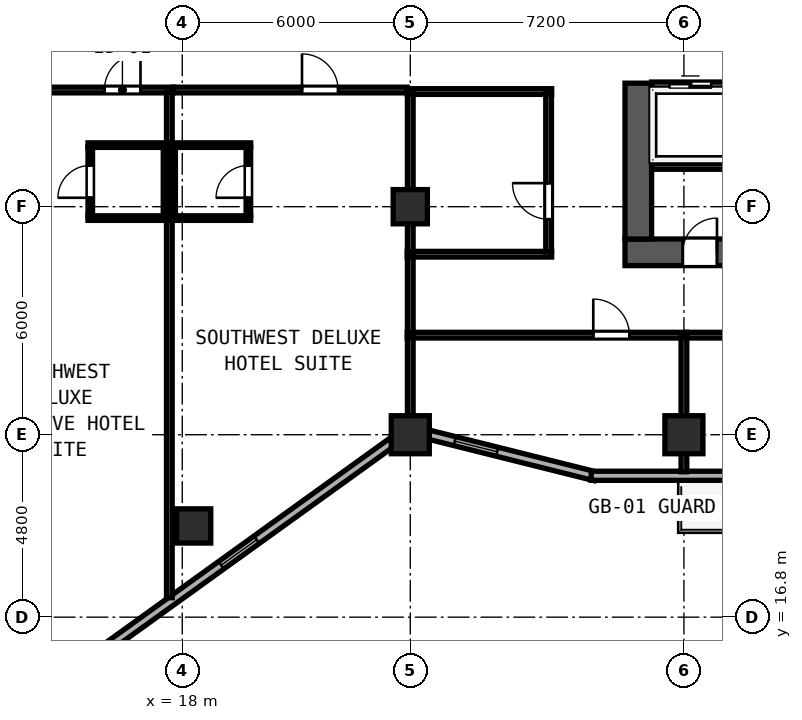
"""IFC4 building model, lengths in metres.
Left out: names, types, materials, properties, quantities, classifications, styles, units other than length and angle.
Written with IfcOpenShell. Run it as: python <this file> out.ifc"""

import sys

from ifc_helpers import new_model, si_unit, direction, frame, frame_2d, origin, origin_2d, place, context, subcontext, project, spatial, rectangle, hollow_rectangle, extrude, element, fill, save


model = new_model("IFC4")
c1 = context("Model", 3, precision=1e-05, world=origin(), true_north=direction((0.0, 1.0)))
c2 = subcontext(c1, "Body", "Model", "MODEL_VIEW")
j1 = project(units=[si_unit("LENGTHUNIT", "METRE"), si_unit("PLANEANGLEUNIT", "RADIAN")], contexts=[c1])
p1 = place(None, origin())
s1 = spatial("IfcSite", under=j1, at=p1, CompositionType="ELEMENT")
p2 = place(p1, origin())
s2 = spatial("IfcBuilding", under=s1, at=p2, CompositionType="ELEMENT")
p3 = place(p2, frame((0.0, 0.0, 144.8)))
s3 = spatial("IfcBuildingStorey", under=s2, at=p3, CompositionType="ELEMENT", Elevation=144.8)
p4 = place(p3, frame((29.65, 26.4, 0.0), z_axis=(0.0, 0.0, 1.0), x_axis=(1.0, 0.0, 0.0)))
e1 = element("IfcWall", 1, at=p4, inside=s3, PredefinedType="SHEAR", context=c2, shape_type="SweptSolid", body=[
    extrude(rectangle(XDim=17.5, YDim=0.7, at=frame_2d((8.75, 0.0))), origin(), (0.0, 0.0, 1.0), 3.6),
])
p5 = place(p4, frame((2.42, 0.0, 0.0), z_axis=(0.0, 0.0, 1.0), x_axis=(-1.0, 0.0, 0.0)))
e2 = element("IfcOpeningElement", 2, at=p5, cuts=e1, PredefinedType="OPENING", context=c2, shape_type="SweptSolid", body=[
    extrude(rectangle(XDim=0.9, YDim=2.1, at=frame_2d((0.45, 1.05))), frame((0.0, 0.36, 0.0), z_axis=(0.0, -1.0, 0.0), x_axis=(1.0, 0.0, 0.0)), (0.0, 0.0, 1.0), 0.72),
])
p6 = place(p4, frame((7.26, 0.0, 0.0), z_axis=(0.0, 0.0, 1.0), x_axis=(-1.0, 0.0, 0.0)))
e3 = element("IfcOpeningElement", 3, at=p6, cuts=e1, PredefinedType="OPENING", context=c2, shape_type="SweptSolid", body=[
    extrude(rectangle(XDim=0.9, YDim=2.1, at=frame_2d((0.45, 1.05))), frame((0.0, 0.36, 0.0), z_axis=(0.0, -1.0, 0.0), x_axis=(1.0, 0.0, 0.0)), (0.0, 0.0, 1.0), 0.72),
])
p7 = place(p4, frame((13.06, 0.0, 0.0), z_axis=(0.0, 0.0, 1.0), x_axis=(-1.0, 0.0, 0.0)))
e4 = element("IfcOpeningElement", 4, at=p7, cuts=e1, PredefinedType="OPENING", context=c2, shape_type="SweptSolid", body=[
    extrude(rectangle(XDim=0.9, YDim=2.1, at=frame_2d((0.45, 1.05))), frame((0.0, 0.36, 0.0), z_axis=(0.0, -1.0, 0.0), x_axis=(1.0, 0.0, 0.0)), (0.0, 0.0, 1.0), 0.72),
])
p8 = place(p3, frame((30.0, 26.75, 0.0), z_axis=(0.0, 0.0, 1.0), x_axis=(0.0, 1.0, 0.0)))
e5 = element("IfcWall", 5, at=p8, inside=s3, PredefinedType="SHEAR", context=c2, shape_type="SweptSolid", body=[
    extrude(rectangle(XDim=4.1, YDim=0.7, at=frame_2d((2.05, 0.0))), origin(), (0.0, 0.0, 1.0), 3.6),
])
for number, where, z_axis, x_axis in (
    (6, (24.0, 21.6, 0.0), (0.0, 0.0, 1.0), (1.0, 0.0, 0.0)),
    (7, (31.2, 21.6, 0.0), (0.0, 0.0, 1.0), (1.0, 0.0, 0.0)),
):
    element("IfcColumn", number, at=place(p3, frame(where, z_axis=z_axis, x_axis=x_axis)), inside=s3, PredefinedType="COLUMN", context=c2, shape_type="SweptSolid", body=[
        extrude(hollow_rectangle(XDim=1.0, YDim=1.0, WallThickness=0.038, at=origin_2d()), origin(), (0.0, 0.0, 1.0), 3.8),
    ])
for number, where, z_axis, x_axis in (
    (8, (24.0, 27.6, 0.0), (0.0, 0.0, 1.0), (1.0, 0.0, 0.0)),
    (9, (18.3, 19.2, 0.0), (0.0, 0.0, 1.0), (1.0, 0.0, 0.0)),
):
    element("IfcColumn", number, at=place(p3, frame(where, z_axis=z_axis, x_axis=x_axis)), inside=s3, PredefinedType="COLUMN", context=c2, shape_type="SweptSolid", body=[
        extrude(hollow_rectangle(XDim=0.9, YDim=0.9, WallThickness=0.034, at=origin_2d()), origin(), (0.0, 0.0, 1.0), 3.8),
    ])
p9 = place(p3, frame((14.075, 14.602, 0.0), z_axis=(0.0, 0.0, 1.0), x_axis=(0.811543504691, 0.584291998913, 0.0)))
e10 = element("IfcWall", 10, at=p9, inside=s3, PredefinedType="SOLIDWALL", context=c2, shape_type="SweptSolid", body=[
    extrude(rectangle(XDim=11.623, YDim=0.24, at=frame_2d((5.812, 0.0))), origin(), (0.0, 0.0, 1.0), 3.145),
])
p10 = place(p9, frame((0.7, 0.0, 0.85)))
e11 = element("IfcOpeningElement", 11, at=p10, cuts=e10, PredefinedType="OPENING", context=c2, shape_type="SweptSolid", body=[
    extrude(rectangle(XDim=1.15, YDim=1.8, at=frame_2d((0.575, 0.9))), frame((0.0, 0.13, 0.0), z_axis=(0.0, -1.0, 0.0), x_axis=(1.0, 0.0, 0.0)), (0.0, 0.0, 1.0), 0.26),
])
p11 = place(p9, frame((6.1, 0.0, 0.85)))
e12 = element("IfcOpeningElement", 12, at=p11, cuts=e10, PredefinedType="OPENING", context=c2, shape_type="SweptSolid", body=[
    extrude(rectangle(XDim=1.15, YDim=1.8, at=frame_2d((0.575, 0.9))), frame((0.0, 0.13, 0.0), z_axis=(0.0, -1.0, 0.0), x_axis=(1.0, 0.0, 0.0)), (0.0, 0.0, 1.0), 0.26),
])
p12 = place(p3, frame((24.492, 21.601, 0.0), z_axis=(0.0, 0.0, 1.0), x_axis=(0.970145683738, -0.242522890311, 0.0)))
e13 = element("IfcWall", 13, at=p12, inside=s3, PredefinedType="SOLIDWALL", context=c2, shape_type="SweptSolid", body=[
    extrude(rectangle(XDim=4.511, YDim=0.24, at=frame_2d((2.255, 0.0))), origin(), (0.0, 0.0, 1.0), 3.145),
])
p13 = place(p12, frame((0.7, 0.0, 0.85)))
e14 = element("IfcOpeningElement", 14, at=p13, cuts=e13, PredefinedType="OPENING", context=c2, shape_type="SweptSolid", body=[
    extrude(rectangle(XDim=1.15, YDim=1.8, at=frame_2d((0.575, 0.9))), frame((0.0, 0.13, 0.0), z_axis=(0.0, -1.0, 0.0), x_axis=(1.0, 0.0, 0.0)), (0.0, 0.0, 1.0), 0.26),
])
p14 = place(p3, frame((28.76, 20.52, 0.0), z_axis=(0.0, 0.0, 1.0), x_axis=(1.0, 0.0, 0.0)))
e15 = element("IfcWall", 15, at=p14, inside=s3, PredefinedType="SOLIDWALL", context=c2, shape_type="SweptSolid", body=[
    extrude(rectangle(XDim=19.281, YDim=0.24, at=frame_2d((9.64, 0.0))), origin(), (0.0, 0.0, 1.0), 3.6),
])
p15 = place(p14, frame((4.84, 0.0, 0.0), z_axis=(0.0, 0.0, 1.0), x_axis=(-1.0, 0.0, 0.0)))
e16 = element("IfcOpeningElement", 16, at=p15, cuts=e15, PredefinedType="OPENING", context=c2, shape_type="SweptSolid", body=[
    extrude(rectangle(XDim=1.2, YDim=2.15, at=frame_2d((0.6, 1.075))), frame((0.0, 0.13, 0.0), z_axis=(0.0, -1.0, 0.0), x_axis=(1.0, 0.0, 0.0)), (0.0, 0.0, 1.0), 0.26),
])
p16 = place(p14, frame((15.64, 0.0, 0.0), z_axis=(0.0, 0.0, 1.0), x_axis=(-1.0, 0.0, 0.0)))
e17 = element("IfcOpeningElement", 17, at=p16, cuts=e15, PredefinedType="OPENING", context=c2, shape_type="SweptSolid", body=[
    extrude(rectangle(XDim=1.2, YDim=2.15, at=frame_2d((0.6, 1.075))), frame((0.0, 0.13, 0.0), z_axis=(0.0, -1.0, 0.0), x_axis=(1.0, 0.0, 0.0)), (0.0, 0.0, 1.0), 0.26),
])
p17 = place(p3, frame((30.35, 30.8, 0.0), z_axis=(0.0, 0.0, 1.0), x_axis=(1.0, 0.0, 0.0)))
e18 = element("IfcWall", 18, at=p17, inside=s3, PredefinedType="SOLIDWALL", context=c2, shape_type="SweptSolid", body=[
    extrude(rectangle(XDim=16.1, YDim=0.16, at=frame_2d((8.05, 0.0))), origin(), (0.0, 0.0, 1.0), 3.6),
])
p18 = place(p17, frame((0.47, 0.0, 0.0)))
e19 = element("IfcOpeningElement", 19, at=p18, cuts=e18, PredefinedType="OPENING", context=c2, shape_type="SweptSolid", body=[
    extrude(rectangle(XDim=1.1, YDim=2.2, at=frame_2d((0.55, 1.1))), frame((0.0, 0.09, 0.0), z_axis=(0.0, -1.0, 0.0), x_axis=(1.0, 0.0, 0.0)), (0.0, 0.0, 1.0), 0.18),
])
p19 = place(p17, frame((2.53, 0.0, 0.0)))
e20 = element("IfcOpeningElement", 20, at=p19, cuts=e18, PredefinedType="OPENING", context=c2, shape_type="SweptSolid", body=[
    extrude(rectangle(XDim=1.1, YDim=2.2, at=frame_2d((0.55, 1.1))), frame((0.0, 0.09, 0.0), z_axis=(0.0, -1.0, 0.0), x_axis=(1.0, 0.0, 0.0)), (0.0, 0.0, 1.0), 0.18),
])
p20 = place(p17, frame((4.59, 0.0, 0.0)))
e21 = element("IfcOpeningElement", 21, at=p20, cuts=e18, PredefinedType="OPENING", context=c2, shape_type="SweptSolid", body=[
    extrude(rectangle(XDim=1.1, YDim=2.2, at=frame_2d((0.55, 1.1))), frame((0.0, 0.09, 0.0), z_axis=(0.0, -1.0, 0.0), x_axis=(1.0, 0.0, 0.0)), (0.0, 0.0, 1.0), 0.18),
])
p21 = place(p17, frame((6.65, 0.0, 0.0)))
e22 = element("IfcOpeningElement", 22, at=p21, cuts=e18, PredefinedType="OPENING", context=c2, shape_type="SweptSolid", body=[
    extrude(rectangle(XDim=1.1, YDim=2.2, at=frame_2d((0.55, 1.1))), frame((0.0, 0.09, 0.0), z_axis=(0.0, -1.0, 0.0), x_axis=(1.0, 0.0, 0.0)), (0.0, 0.0, 1.0), 0.18),
])
p22 = place(p3, frame((30.35, 28.66, 0.0), z_axis=(0.0, 0.0, 1.0), x_axis=(1.0, 0.0, 0.0)))
e23 = element("IfcWall", 23, at=p22, inside=s3, PredefinedType="PARTITIONING", context=c2, shape_type="SweptSolid", body=[
    extrude(rectangle(XDim=16.1, YDim=0.15, at=frame_2d((8.05, 0.0))), origin(), (0.0, 0.0, 1.0), 3.6),
])
for number, where, z_axis, x_axis in (
    (24, (23.92, 30.63, 0.0), (0.0, 0.0, 1.0), (1.0, 0.0, 0.0)),
    (25, (23.92, 26.35, 0.0), (0.0, 0.0, 1.0), (1.0, 0.0, 0.0)),
):
    element("IfcWall", number, at=place(p3, frame(where, z_axis=z_axis, x_axis=x_axis)), inside=s3, PredefinedType="PARTITIONING", context=c2, shape_type="SweptSolid", body=[
        extrude(rectangle(XDim=3.8, YDim=0.15, at=frame_2d((1.9, 0.0))), origin(), (0.0, 0.0, 1.0), 3.6),
    ])
p23 = place(p3, frame((24.0, 26.41, 0.0), z_axis=(0.0, 0.0, 1.0), x_axis=(0.0, 1.0, 0.0)))
e26 = element("IfcWall", 26, at=p23, inside=s3, PredefinedType="PARTITIONING", context=c2, shape_type="SweptSolid", body=[
    extrude(rectangle(XDim=4.16, YDim=0.15, at=frame_2d((2.08, 0.0))), origin(), (0.0, 0.0, 1.0), 3.145),
])
p24 = place(p3, frame((27.64, 26.41, 0.0), z_axis=(0.0, 0.0, 1.0), x_axis=(0.0, 1.0, 0.0)))
e27 = element("IfcWall", 27, at=p24, inside=s3, PredefinedType="PARTITIONING", context=c2, shape_type="SweptSolid", body=[
    extrude(rectangle(XDim=4.16, YDim=0.15, at=frame_2d((2.08, 0.0))), origin(), (0.0, 0.0, 1.0), 3.6),
])
p25 = place(p24, frame((1.81, 0.0, 0.0), z_axis=(0.0, 0.0, 1.0), x_axis=(-1.0, 0.0, 0.0)))
e28 = element("IfcOpeningElement", 28, at=p25, cuts=e27, PredefinedType="OPENING", context=c2, shape_type="SweptSolid", body=[
    extrude(rectangle(XDim=0.95, YDim=2.12, at=frame_2d((0.475, 1.06))), frame((0.0, 0.085, 0.0), z_axis=(0.0, -1.0, 0.0), x_axis=(1.0, 0.0, 0.0)), (0.0, 0.0, 1.0), 0.17),
])
p26 = place(p3, frame((23.92, 24.22, 0.0), z_axis=(0.0, 0.0, 1.0), x_axis=(1.0, 0.0, 0.0)))
e29 = element("IfcWall", 29, at=p26, inside=s3, PredefinedType="PARTITIONING", context=c2, shape_type="SweptSolid", body=[
    extrude(rectangle(XDim=7.36, YDim=0.15, at=frame_2d((3.68, 0.0))), origin(), (0.0, 0.0, 1.0), 3.6),
])
p27 = place(p26, frame((5.845, 0.0, 0.0), z_axis=(0.0, 0.0, 1.0), x_axis=(-1.0, 0.0, 0.0)))
e30 = element("IfcOpeningElement", 30, at=p27, cuts=e29, PredefinedType="OPENING", context=c2, shape_type="SweptSolid", body=[
    extrude(rectangle(XDim=0.95, YDim=2.12, at=frame_2d((0.475, 1.06))), frame((0.0, 0.085, 0.0), z_axis=(0.0, -1.0, 0.0), x_axis=(1.0, 0.0, 0.0)), (0.0, 0.0, 1.0), 0.17),
])
p28 = place(p3, frame((24.0, 21.819, 0.0), z_axis=(0.0, 0.0, 1.0), x_axis=(0.0, 1.0, 0.0)))
e31 = element("IfcWall", 31, at=p28, inside=s3, PredefinedType="PARTITIONING", context=c2, shape_type="SweptSolid", body=[
    extrude(rectangle(XDim=2.341, YDim=0.15, at=frame_2d((1.171, 0.0))), origin(), (0.0, 0.0, 1.0), 3.145),
])
p29 = place(p3, frame((31.2, 20.625, 0.0), z_axis=(0.0, 0.0, 1.0), x_axis=(0.0, 1.0, 0.0)))
e32 = element("IfcWall", 32, at=p29, inside=s3, PredefinedType="PARTITIONING", context=c2, shape_type="SweptSolid", body=[
    extrude(rectangle(XDim=3.535, YDim=0.15, at=frame_2d((1.768, 0.0))), origin(), (0.0, 0.0, 1.0), 3.085),
])
p30 = place(p3, frame((31.282, 24.22, 0.0), z_axis=(0.0, 0.0, 1.0), x_axis=(1.0, 0.0, 0.0)))
e33 = element("IfcWall", 33, at=p30, inside=s3, PredefinedType="PARTITIONING", context=c2, shape_type="SweptSolid", body=[
    extrude(rectangle(XDim=7.198, YDim=0.15, at=frame_2d((3.599, 0.0))), origin(), (0.0, 0.0, 1.0), 3.6),
])
p31 = place(p30, frame((3.913, 0.0, 0.0), z_axis=(0.0, 0.0, 1.0), x_axis=(-1.0, 0.0, 0.0)))
e34 = element("IfcOpeningElement", 34, at=p31, cuts=e33, PredefinedType="OPENING", context=c2, shape_type="SweptSolid", body=[
    extrude(rectangle(XDim=0.95, YDim=2.12, at=frame_2d((0.475, 1.06))), frame((0.0, 0.085, 0.0), z_axis=(0.0, -1.0, 0.0), x_axis=(1.0, 0.0, 0.0)), (0.0, 0.0, 1.0), 0.17),
])
p32 = place(p3, frame((11.7, 30.67, 0.0), z_axis=(0.0, 0.0, 1.0), x_axis=(1.0, 0.0, 0.0)))
e35 = element("IfcWall", 35, at=p32, inside=s3, PredefinedType="PARTITIONING", context=c2, shape_type="SweptSolid", body=[
    extrude(rectangle(XDim=6.06, YDim=0.15, at=frame_2d((3.03, 0.0))), origin(), (0.0, 0.0, 1.0), 3.6),
])
p33 = place(p32, frame((5.201, 0.0, 0.0), z_axis=(0.0, 0.0, 1.0), x_axis=(-1.0, 0.0, 0.0)))
e36 = element("IfcOpeningElement", 36, at=p33, cuts=e35, PredefinedType="OPENING", context=c2, shape_type="SweptSolid", body=[
    extrude(rectangle(XDim=0.95, YDim=2.18, at=frame_2d((0.475, 1.09))), frame((0.0, 0.085, 0.0), z_axis=(0.0, -1.0, 0.0), x_axis=(1.0, 0.0, 0.0)), (0.0, 0.0, 1.0), 0.17),
])
p34 = place(p3, frame((17.66, 17.312, 0.0), z_axis=(0.0, 0.0, 1.0), x_axis=(0.0, 1.0, 0.0)))
e37 = element("IfcWall", 37, at=p34, inside=s3, PredefinedType="PARTITIONING", context=c2, shape_type="SweptSolid", body=[
    extrude(rectangle(XDim=13.298, YDim=0.15, at=frame_2d((6.649, 0.0))), origin(), (0.0, 0.0, 1.0), 3.6),
])
for number, where, z_axis, x_axis in (
    (38, (15.52, 29.22, 0.0), (0.0, 0.0, 1.0), (1.0, 0.0, 0.0)),
    (39, (15.52, 27.3, 0.0), (0.0, 0.0, 1.0), (1.0, 0.0, 0.0)),
):
    element("IfcWall", number, at=place(p3, frame(where, z_axis=z_axis, x_axis=x_axis)), inside=s3, PredefinedType="PARTITIONING", context=c2, shape_type="SweptSolid", body=[
        extrude(rectangle(XDim=2.08, YDim=0.12, at=frame_2d((1.04, 0.0))), origin(), (0.0, 0.0, 1.0), 3.6),
    ])
p35 = place(p3, frame((15.58, 27.345, 0.0), z_axis=(0.0, 0.0, 1.0), x_axis=(0.0, 1.0, 0.0)))
e40 = element("IfcWall", 40, at=p35, inside=s3, PredefinedType="PARTITIONING", context=c2, shape_type="SweptSolid", body=[
    extrude(rectangle(XDim=1.83, YDim=0.12, at=frame_2d((0.915, 0.0))), origin(), (0.0, 0.0, 1.0), 3.6),
])
p36 = place(p35, frame((1.34, 0.0, 0.0), z_axis=(0.0, 0.0, 1.0), x_axis=(-1.0, 0.0, 0.0)))
e41 = element("IfcOpeningElement", 41, at=p36, cuts=e40, PredefinedType="OPENING", context=c2, shape_type="SweptSolid", body=[
    extrude(rectangle(XDim=0.85, YDim=2.1, at=frame_2d((0.425, 1.05))), frame((0.0, 0.07, 0.0), z_axis=(0.0, -1.0, 0.0), x_axis=(1.0, 0.0, 0.0)), (0.0, 0.0, 1.0), 0.14),
])
p37 = place(p3, frame((17.56, 27.345, 0.0), z_axis=(0.0, 0.0, 1.0), x_axis=(0.0, 1.0, 0.0)))
e42 = element("IfcWall", 42, at=p37, inside=s3, PredefinedType="PARTITIONING", context=c2, shape_type="SweptSolid", body=[
    extrude(rectangle(XDim=1.83, YDim=0.12, at=frame_2d((0.915, 0.0))), origin(), (0.0, 0.0, 1.0), 3.6),
])
p38 = place(p3, frame((17.762, 30.67, 0.0), z_axis=(0.0, 0.0, 1.0), x_axis=(1.0, 0.0, 0.0)))
e43 = element("IfcWall", 43, at=p38, inside=s3, PredefinedType="PARTITIONING", context=c2, shape_type="SweptSolid", body=[
    extrude(rectangle(XDim=6.156, YDim=0.15, at=frame_2d((3.078, 0.0))), origin(), (0.0, 0.0, 1.0), 3.6),
])
p39 = place(p38, frame((4.339, 0.0, 0.0), z_axis=(0.0, 0.0, 1.0), x_axis=(-1.0, 0.0, 0.0)))
e44 = element("IfcOpeningElement", 44, at=p39, cuts=e43, PredefinedType="OPENING", context=c2, shape_type="SweptSolid", body=[
    extrude(rectangle(XDim=0.95, YDim=2.18, at=frame_2d((0.475, 1.09))), frame((0.0, 0.085, 0.0), z_axis=(0.0, -1.0, 0.0), x_axis=(1.0, 0.0, 0.0)), (0.0, 0.0, 1.0), 0.17),
])
p40 = place(p3, frame((24.0, 24.28, 0.0), z_axis=(0.0, 0.0, 1.0), x_axis=(0.0, 1.0, 0.0)))
e45 = element("IfcWall", 45, at=p40, inside=s3, PredefinedType="PARTITIONING", context=c2, shape_type="SweptSolid", body=[
    extrude(rectangle(XDim=2.01, YDim=0.15, at=frame_2d((1.005, 0.0))), origin(), (0.0, 0.0, 1.0), 3.145),
])
for number, where, z_axis, x_axis in (
    (46, (17.72, 29.22, 0.0), (0.0, 0.0, 1.0), (1.0, 0.0, 0.0)),
    (47, (17.72, 27.3, 0.0), (0.0, 0.0, 1.0), (1.0, 0.0, 0.0)),
):
    element("IfcWall", number, at=place(p3, frame(where, z_axis=z_axis, x_axis=x_axis)), inside=s3, PredefinedType="PARTITIONING", context=c2, shape_type="SweptSolid", body=[
        extrude(rectangle(XDim=2.08, YDim=0.12, at=frame_2d((1.04, 0.0))), origin(), (0.0, 0.0, 1.0), 3.6),
    ])
p41 = place(p3, frame((17.76, 27.345, 0.0), z_axis=(0.0, 0.0, 1.0), x_axis=(0.0, 1.0, 0.0)))
e48 = element("IfcWall", 48, at=p41, inside=s3, PredefinedType="PARTITIONING", context=c2, shape_type="SweptSolid", body=[
    extrude(rectangle(XDim=1.83, YDim=0.12, at=frame_2d((0.915, 0.0))), origin(), (0.0, 0.0, 1.0), 3.6),
])
p42 = place(p3, frame((19.74, 27.345, 0.0), z_axis=(0.0, 0.0, 1.0), x_axis=(0.0, 1.0, 0.0)))
e49 = element("IfcWall", 49, at=p42, inside=s3, PredefinedType="PARTITIONING", context=c2, shape_type="SweptSolid", body=[
    extrude(rectangle(XDim=1.83, YDim=0.12, at=frame_2d((0.915, 0.0))), origin(), (0.0, 0.0, 1.0), 3.6),
])
p43 = place(p42, frame((0.49, 0.0, 0.0)))
e50 = element("IfcOpeningElement", 50, at=p43, cuts=e49, PredefinedType="OPENING", context=c2, shape_type="SweptSolid", body=[
    extrude(rectangle(XDim=0.85, YDim=2.1, at=frame_2d((0.425, 1.05))), frame((0.0, 0.07, 0.0), z_axis=(0.0, -1.0, 0.0), x_axis=(1.0, 0.0, 0.0)), (0.0, 0.0, 1.0), 0.14),
])
p44 = place(p11, origin())
e51 = element("IfcWindow", 51, at=p44, inside=s3, PartitioningType="SINGLE_PANEL", PredefinedType="WINDOW", context=c2, shape_type="SweptSolid", body=[
    extrude(rectangle(XDim=1.15, YDim=1.8, at=frame_2d((0.575, 0.9))), frame((0.0, 0.03, 0.0), z_axis=(0.0, -1.0, 0.0), x_axis=(1.0, 0.0, 0.0)), (0.0, 0.0, 1.0), 0.06),
])
fill(e12, e51)
p45 = place(p13, origin())
e52 = element("IfcWindow", 52, at=p45, inside=s3, PartitioningType="SINGLE_PANEL", PredefinedType="WINDOW", context=c2, shape_type="SweptSolid", body=[
    extrude(rectangle(XDim=1.15, YDim=1.8, at=frame_2d((0.575, 0.9))), frame((0.0, 0.03, 0.0), z_axis=(0.0, -1.0, 0.0), x_axis=(1.0, 0.0, 0.0)), (0.0, 0.0, 1.0), 0.06),
])
fill(e14, e52)
p46 = place(p18, origin())
e53 = element("IfcDoor", 53, at=p46, inside=s3, OperationType="SLIDING_TO_LEFT", PredefinedType="DOOR", context=c2, shape_type="SweptSolid", body=[
    extrude(rectangle(XDim=1.1, YDim=2.2, at=frame_2d((0.55, 1.1))), frame((0.0, 0.025, 0.0), z_axis=(0.0, -1.0, 0.0), x_axis=(1.0, 0.0, 0.0)), (0.0, 0.0, 1.0), 0.05),
])
fill(e19, e53)
p47 = place(p5, origin())
e54 = element("IfcDoor", 54, at=p47, inside=s3, OperationType="SINGLE_SWING_LEFT", PredefinedType="DOOR", context=c2, shape_type="SweptSolid", body=[
    extrude(rectangle(XDim=0.9, YDim=2.1, at=frame_2d((0.45, 1.05))), frame((0.0, -0.195, 0.0), z_axis=(0.0, -1.0, 0.0), x_axis=(1.0, 0.0, 0.0)), (0.0, 0.0, 1.0), 0.05),
])
fill(e2, e54)
p48 = place(p25, origin())
e55 = element("IfcDoor", 55, at=p48, inside=s3, OperationType="SINGLE_SWING_LEFT", PredefinedType="DOOR", context=c2, shape_type="SweptSolid", body=[
    extrude(rectangle(XDim=0.95, YDim=2.12, at=frame_2d((0.475, 1.06))), frame((0.0, 0.025, 0.0), z_axis=(0.0, -1.0, 0.0), x_axis=(1.0, 0.0, 0.0)), (0.0, 0.0, 1.0), 0.05),
])
fill(e28, e55)
p49 = place(p27, origin())
e56 = element("IfcDoor", 56, at=p49, inside=s3, OperationType="SINGLE_SWING_RIGHT", PredefinedType="DOOR", context=c2, shape_type="SweptSolid", body=[
    extrude(rectangle(XDim=0.95, YDim=2.12, at=frame_2d((0.475, 1.06))), frame((0.0, 0.025, 0.0), z_axis=(0.0, -1.0, 0.0), x_axis=(1.0, 0.0, 0.0)), (0.0, 0.0, 1.0), 0.05),
])
fill(e30, e56)
p50 = place(p33, origin())
e57 = element("IfcDoor", 57, at=p50, inside=s3, OperationType="SINGLE_SWING_LEFT", PredefinedType="DOOR", context=c2, shape_type="SweptSolid", body=[
    extrude(rectangle(XDim=0.95, YDim=2.18, at=frame_2d((0.475, 1.09))), frame((0.0, 0.025, 0.0), z_axis=(0.0, -1.0, 0.0), x_axis=(1.0, 0.0, 0.0)), (0.0, 0.0, 1.0), 0.05),
])
fill(e36, e57)
p51 = place(p36, origin())
e58 = element("IfcDoor", 58, at=p51, inside=s3, OperationType="SINGLE_SWING_RIGHT", PredefinedType="DOOR", context=c2, shape_type="SweptSolid", body=[
    extrude(rectangle(XDim=0.85, YDim=2.1, at=frame_2d((0.425, 1.05))), frame((0.0, 0.025, 0.0), z_axis=(0.0, -1.0, 0.0), x_axis=(1.0, 0.0, 0.0)), (0.0, 0.0, 1.0), 0.05),
])
fill(e41, e58)
p52 = place(p39, origin())
e59 = element("IfcDoor", 59, at=p52, inside=s3, OperationType="SINGLE_SWING_RIGHT", PredefinedType="DOOR", context=c2, shape_type="SweptSolid", body=[
    extrude(rectangle(XDim=0.95, YDim=2.18, at=frame_2d((0.475, 1.09))), frame((0.0, 0.025, 0.0), z_axis=(0.0, -1.0, 0.0), x_axis=(1.0, 0.0, 0.0)), (0.0, 0.0, 1.0), 0.05),
])
fill(e44, e59)
p53 = place(p43, origin())
e60 = element("IfcDoor", 60, at=p53, inside=s3, OperationType="SINGLE_SWING_LEFT", PredefinedType="DOOR", context=c2, shape_type="SweptSolid", body=[
    extrude(rectangle(XDim=0.85, YDim=2.1, at=frame_2d((0.425, 1.05))), frame((0.0, 0.025, 0.0), z_axis=(0.0, -1.0, 0.0), x_axis=(1.0, 0.0, 0.0)), (0.0, 0.0, 1.0), 0.05),
])
fill(e50, e60)
save(model, sys.argv[1])
